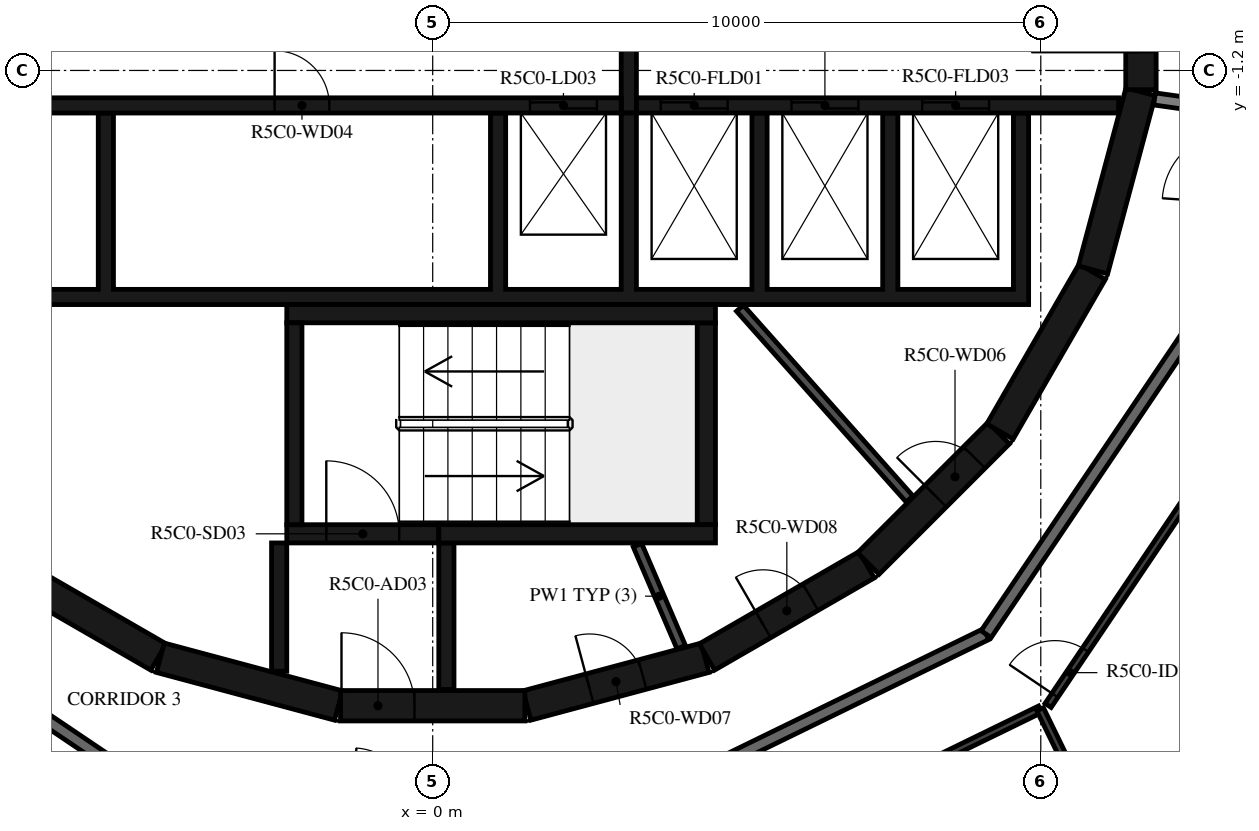
"""IFC4 building model, lengths in metres.
Left out: names, types, materials, properties, quantities, classifications, styles, units other than length and angle.
Written with IfcOpenShell. Run it as: python <this file> out.ifc"""

import sys

from ifc_helpers import new_model, si_unit, direction, frame, frame_2d, origin, place, context, subcontext, project, spatial, polyline, rectangle, outline, extrude, element, fill, save


model = new_model("IFC4")
c1 = context("Model", 3, precision=1e-05, world=origin(), true_north=direction((0.0, 1.0)))
c2 = subcontext(c1, "Body", "Model", "MODEL_VIEW")
j1 = project(units=[si_unit("LENGTHUNIT", "METRE"), si_unit("PLANEANGLEUNIT", "RADIAN")], contexts=[c1])
p1 = place(None, origin())
s1 = spatial("IfcSite", under=j1, at=p1, CompositionType="ELEMENT")
p2 = place(p1, origin())
s2 = spatial("IfcBuilding", under=s1, at=p2, CompositionType="ELEMENT")
p3 = place(p2, frame((0.0, 0.0, 216.4)))
s3 = spatial("IfcBuildingStorey", under=s2, at=p3, CompositionType="ELEMENT", Elevation=216.4)
p4 = place(p3, frame((1.55, -11.643, 0.0), z_axis=(0.0, 0.0, 1.0), x_axis=(0.965948410781, 0.258734743916, 0.0)))
e1 = element("IfcWall", 1, at=p4, inside=s3, PredefinedType="SHEAR", context=c2, shape_type="SweptSolid", body=[
    extrude(rectangle(XDim=3.033, YDim=0.5, at=frame_2d((1.516, 0.0))), origin(), (0.0, 0.0, 1.0), 3.05),
])
p5 = place(p4, frame((1.066, 0.0, 0.0)))
e2 = element("IfcOpeningElement", 2, at=p5, cuts=e1, PredefinedType="OPENING", context=c2, shape_type="SweptSolid", body=[
    extrude(rectangle(XDim=0.9, YDim=2.1, at=frame_2d((0.45, 1.05))), frame((0.0, 0.26, 0.0), z_axis=(0.0, -1.0, 0.0), x_axis=(1.0, 0.0, 0.0)), (0.0, 0.0, 1.0), 0.52),
])
p6 = place(p3, frame((4.51, -10.845, 0.0), z_axis=(0.0, 0.0, 1.0), x_axis=(0.865975092491, 0.500087131594, 0.0)))
e3 = element("IfcWall", 3, at=p6, inside=s3, PredefinedType="SHEAR", context=c2, shape_type="SweptSolid", body=[
    extrude(rectangle(XDim=3.033, YDim=0.5, at=frame_2d((1.516, 0.0))), origin(), (0.0, 0.0, 1.0), 3.05),
])
p7 = place(p6, frame((1.066, 0.0, 0.0)))
e4 = element("IfcOpeningElement", 4, at=p7, cuts=e3, PredefinedType="OPENING", context=c2, shape_type="SweptSolid", body=[
    extrude(rectangle(XDim=0.9, YDim=2.1, at=frame_2d((0.45, 1.05))), frame((0.0, 0.26, 0.0), z_axis=(0.0, -1.0, 0.0), x_axis=(1.0, 0.0, 0.0)), (0.0, 0.0, 1.0), 0.52),
])
p8 = place(p3, frame((7.164, -9.308, 0.0), z_axis=(0.0, 0.0, 1.0), x_axis=(0.707106781187, 0.707106781187, 0.0)))
e5 = element("IfcWall", 5, at=p8, inside=s3, PredefinedType="SHEAR", context=c2, shape_type="SweptSolid", body=[
    extrude(rectangle(XDim=3.032, YDim=0.5, at=frame_2d((1.516, 0.0))), origin(), (0.0, 0.0, 1.0), 3.05),
])
p9 = place(p8, frame((1.566, 0.0, 0.0)))
e6 = element("IfcOpeningElement", 6, at=p9, cuts=e5, PredefinedType="OPENING", context=c2, shape_type="SweptSolid", body=[
    extrude(rectangle(XDim=0.9, YDim=2.1, at=frame_2d((0.45, 1.05))), frame((0.0, 0.26, 0.0), z_axis=(0.0, -1.0, 0.0), x_axis=(1.0, 0.0, 0.0)), (0.0, 0.0, 1.0), 0.52),
])
for number, where, z_axis, x_axis in (
    (7, (9.329, -7.137, 0.0), (0.0, 0.0, 1.0), (0.5, 0.866, 0.0)),
    (8, (10.858, -4.479, 0.0), (0.0, 0.0, 1.0), (0.259, 0.966, 0.0)),
):
    element("IfcWall", number, at=place(p3, frame(where, z_axis=z_axis, x_axis=x_axis)), inside=s3, PredefinedType="SHEAR", context=c2, shape_type="SweptSolid", body=[
        extrude(rectangle(XDim=3.033, YDim=0.5, at=frame_2d((1.516, 0.0))), origin(), (0.0, 0.0, 1.0), 3.05),
    ])
p10 = place(p3, frame((11.647, -1.516, 0.0), z_axis=(0.0, 0.0, 1.0), x_axis=(0.0, 1.0, 0.0)))
e9 = element("IfcWall", 9, at=p10, inside=s3, PredefinedType="SHEAR", context=c2, shape_type="SweptSolid", body=[
    extrude(rectangle(XDim=3.033, YDim=0.5, at=frame_2d((1.516, 0.0))), origin(), (0.0, 0.0, 1.0), 3.05),
])
p11 = place(p10, frame((0.616, 0.0, 0.0)))
e10 = element("IfcOpeningElement", 10, at=p11, cuts=e9, PredefinedType="OPENING", context=c2, shape_type="SweptSolid", body=[
    extrude(rectangle(XDim=1.8, YDim=2.1, at=frame_2d((0.9, 1.05))), frame((0.0, 0.26, 0.0), z_axis=(0.0, -1.0, 0.0), x_axis=(1.0, 0.0, 0.0)), (0.0, 0.0, 1.0), 0.52),
])
for number, where, z_axis, x_axis in (
    (11, (-7.137, -9.329, 0.0), (0.0, 0.0, 1.0), (0.866, -0.5, 0.0)),
    (12, (-4.479, -10.858, 0.0), (0.0, 0.0, 1.0), (0.966, -0.259, 0.0)),
):
    element("IfcWall", number, at=place(p3, frame(where, z_axis=z_axis, x_axis=x_axis)), inside=s3, PredefinedType="SHEAR", context=c2, shape_type="SweptSolid", body=[
        extrude(rectangle(XDim=3.033, YDim=0.5, at=frame_2d((1.516, 0.0))), origin(), (0.0, 0.0, 1.0), 3.05),
    ])
p12 = place(p3, frame((-1.516, -11.647, 0.0), z_axis=(0.0, 0.0, 1.0), x_axis=(1.0, 0.0, 0.0)))
e13 = element("IfcWall", 13, at=p12, inside=s3, PredefinedType="SHEAR", context=c2, shape_type="SweptSolid", body=[
    extrude(rectangle(XDim=3.033, YDim=0.5, at=frame_2d((1.516, 0.0))), origin(), (0.0, 0.0, 1.0), 3.05),
])
p13 = place(p12, frame((0.016, 0.0, 0.0)))
e14 = element("IfcOpeningElement", 14, at=p13, cuts=e13, PredefinedType="OPENING", context=c2, shape_type="SweptSolid", body=[
    extrude(rectangle(XDim=1.2, YDim=2.1, at=frame_2d((0.6, 1.05))), frame((0.0, 0.26, 0.0), z_axis=(0.0, -1.0, 0.0), x_axis=(1.0, 0.0, 0.0)), (0.0, 0.0, 1.0), 0.52),
])
p14 = place(p3, frame((-2.275, -8.67, 0.0), z_axis=(0.0, 0.0, 1.0), x_axis=(0.0, 1.0, 0.0)))
e15 = element("IfcWall", 15, at=p14, inside=s3, PredefinedType="SHEAR", context=c2, shape_type="SweptSolid", body=[
    extrude(rectangle(XDim=3.32, YDim=0.25, at=frame_2d((1.66, 0.0))), origin(), (0.0, 0.0, 1.0), 3.05),
])
p15 = place(p3, frame((-2.4, -5.2, 0.0), z_axis=(0.0, 0.0, 1.0), x_axis=(1.0, 0.0, 0.0)))
e16 = element("IfcWall", 16, at=p15, inside=s3, PredefinedType="SHEAR", context=c2, shape_type="SweptSolid", body=[
    extrude(rectangle(XDim=7.05, YDim=0.3, at=frame_2d((3.525, 0.0))), origin(), (0.0, 0.0, 1.0), 3.05),
])
p16 = place(p3, frame((4.5, -8.67, 0.0), z_axis=(0.0, 0.0, 1.0), x_axis=(0.0, 1.0, 0.0)))
e17 = element("IfcWall", 17, at=p16, inside=s3, PredefinedType="SHEAR", context=c2, shape_type="SweptSolid", body=[
    extrude(rectangle(XDim=3.32, YDim=0.3, at=frame_2d((1.66, 0.0))), origin(), (0.0, 0.0, 1.0), 3.05),
])
p17 = place(p3, frame((0.1, -8.82, 0.0), z_axis=(0.0, 0.0, 1.0), x_axis=(1.0, 0.0, 0.0)))
e18 = element("IfcWall", 18, at=p17, inside=s3, PredefinedType="SHEAR", context=c2, shape_type="SweptSolid", body=[
    extrude(rectangle(XDim=4.55, YDim=0.3, at=frame_2d((2.275, 0.0))), origin(), (0.0, 0.0, 1.0), 3.05),
])
p18 = place(p3, frame((-2.4, -8.82, 0.0), z_axis=(0.0, 0.0, 1.0), x_axis=(1.0, 0.0, 0.0)))
e19 = element("IfcWall", 19, at=p18, inside=s3, PredefinedType="SHEAR", context=c2, shape_type="SweptSolid", body=[
    extrude(rectangle(XDim=2.5, YDim=0.3, at=frame_2d((1.25, 0.0))), origin(), (0.0, 0.0, 1.0), 3.05),
])
p19 = place(p18, frame((0.65, 0.0, 0.0)))
e20 = element("IfcOpeningElement", 20, at=p19, cuts=e19, PredefinedType="OPENING", context=c2, shape_type="SweptSolid", body=[
    extrude(rectangle(XDim=1.2, YDim=2.1, at=frame_2d((0.6, 1.05))), frame((0.0, 0.16, 0.0), z_axis=(0.0, -1.0, 0.0), x_axis=(1.0, 0.0, 0.0)), (0.0, 0.0, 1.0), 0.32),
])
p20 = place(p3, frame((-2.525, -8.97, 0.0), z_axis=(0.0, 0.0, 1.0), x_axis=(0.0, -1.0, 0.0)))
e21 = element("IfcWall", 21, at=p20, inside=s3, PredefinedType="SHEAR", context=c2, shape_type="SweptSolid", body=[
    extrude(rectangle(XDim=2.11, YDim=0.25, at=frame_2d((1.055, 0.0))), origin(), (0.0, 0.0, 1.0), 3.05),
])
p21 = place(p3, frame((0.225, -8.97, 0.0), z_axis=(0.0, 0.0, 1.0), x_axis=(0.0, -1.0, 0.0)))
e22 = element("IfcWall", 22, at=p21, inside=s3, PredefinedType="SHEAR", context=c2, shape_type="SweptSolid", body=[
    extrude(rectangle(XDim=2.41, YDim=0.25, at=frame_2d((1.205, 0.0))), origin(), (0.0, 0.0, 1.0), 3.05),
])
p22 = place(p3, origin())
e23 = element("IfcWall", 23, at=p22, inside=s3, PredefinedType="SHEAR", context=c2, shape_type="SweptSolid", body=[
    extrude(outline(polyline([(9.8, -5.05), (9.8, -4.8), (9.8, -1.9), (9.55, -1.9), (9.55, -4.8), (7.65, -4.8), (7.65, -1.9), (7.4, -1.9), (7.4, -4.8), (5.5, -4.8), (5.5, -1.9), (5.25, -1.9), (5.25, -4.8), (3.35, -4.8), (3.35, -1.9), (3.1, -1.9), (3.1, -4.8), (1.2, -4.8), (1.2, -1.9), (0.95, -1.9), (0.95, -4.8), (-5.25, -4.8), (-5.25, -1.9), (-5.5, -1.9), (-5.5, -4.8), (-7.4, -4.8), (-7.4, -1.9), (-7.65, -1.9), (-7.65, -4.8), (-9.55, -4.8), (-9.55, -1.9), (-9.8, -1.9), (-9.8, -4.8), (-9.8, -5.05), (9.8, -5.05)])), origin(), (0.0, 0.0, 1.0), 3.05),
])
p23 = place(p3, frame((-11.28, -1.775, 0.0), z_axis=(0.0, 0.0, 1.0), x_axis=(1.0, 0.0, 0.0)))
e24 = element("IfcWall", 24, at=p23, inside=s3, PredefinedType="SHEAR", context=c2, shape_type="SweptSolid", body=[
    extrude(rectangle(XDim=14.38, YDim=0.25, at=frame_2d((7.19, 0.0))), origin(), (0.0, 0.0, 1.0), 3.05),
])
p24 = place(p23, frame((12.88, 0.0, 0.0)))
e25 = element("IfcOpeningElement", 25, at=p24, cuts=e24, PredefinedType="OPENING", context=c2, shape_type="SweptSolid", body=[
    extrude(rectangle(XDim=1.1, YDim=2.1, at=frame_2d((0.55, 1.05))), frame((0.0, 0.135, 0.0), z_axis=(0.0, -1.0, 0.0), x_axis=(1.0, 0.0, 0.0)), (0.0, 0.0, 1.0), 0.27),
])
p25 = place(p23, frame((8.68, 0.0, 0.0)))
e26 = element("IfcOpeningElement", 26, at=p25, cuts=e24, PredefinedType="OPENING", context=c2, shape_type="SweptSolid", body=[
    extrude(rectangle(XDim=0.9, YDim=2.1, at=frame_2d((0.45, 1.05))), frame((0.0, 0.135, 0.0), z_axis=(0.0, -1.0, 0.0), x_axis=(1.0, 0.0, 0.0)), (0.0, 0.0, 1.0), 0.27),
])
p26 = place(p3, frame((3.35, -1.775, 0.0), z_axis=(0.0, 0.0, 1.0), x_axis=(1.0, 0.0, 0.0)))
e27 = element("IfcWall", 27, at=p26, inside=s3, PredefinedType="SHEAR", context=c2, shape_type="SweptSolid", body=[
    extrude(rectangle(XDim=7.93, YDim=0.25, at=frame_2d((3.965, 0.0))), origin(), (0.0, 0.0, 1.0), 3.05),
])
p27 = place(p26, frame((0.4, 0.0, 0.0)))
e28 = element("IfcOpeningElement", 28, at=p27, cuts=e27, PredefinedType="OPENING", context=c2, shape_type="SweptSolid", body=[
    extrude(rectangle(XDim=1.1, YDim=2.4, at=frame_2d((0.55, 1.2))), frame((0.0, 0.135, 0.0), z_axis=(0.0, -1.0, 0.0), x_axis=(1.0, 0.0, 0.0)), (0.0, 0.0, 1.0), 0.27),
])
p28 = place(p26, frame((2.55, 0.0, 0.0)))
e29 = element("IfcOpeningElement", 29, at=p28, cuts=e27, PredefinedType="OPENING", context=c2, shape_type="SweptSolid", body=[
    extrude(rectangle(XDim=1.1, YDim=2.4, at=frame_2d((0.55, 1.2))), frame((0.0, 0.135, 0.0), z_axis=(0.0, -1.0, 0.0), x_axis=(1.0, 0.0, 0.0)), (0.0, 0.0, 1.0), 0.27),
])
p29 = place(p26, frame((4.7, 0.0, 0.0)))
e30 = element("IfcOpeningElement", 30, at=p29, cuts=e27, PredefinedType="OPENING", context=c2, shape_type="SweptSolid", body=[
    extrude(rectangle(XDim=1.1, YDim=2.4, at=frame_2d((0.55, 1.2))), frame((0.0, 0.135, 0.0), z_axis=(0.0, -1.0, 0.0), x_axis=(1.0, 0.0, 0.0)), (0.0, 0.0, 1.0), 0.27),
])
p30 = place(p3, frame((3.225, -1.9, 0.0), z_axis=(0.0, 0.0, 1.0), x_axis=(0.0, 1.0, 0.0)))
e31 = element("IfcWall", 31, at=p30, inside=s3, PredefinedType="SHEAR", context=c2, shape_type="SweptSolid", body=[
    extrude(rectangle(XDim=3.8, YDim=0.25, at=frame_2d((1.9, 0.0))), origin(), (0.0, 0.0, 1.0), 3.05),
])
p31 = place(p3, frame((7.842, -8.248, 0.0), z_axis=(0.0, 0.0, 1.0), x_axis=(-0.66446128181, 0.747322691329, 0.0)))
e32 = element("IfcWall", 32, at=p31, inside=s3, PredefinedType="PARTITIONING", context=c2, shape_type="SweptSolid", body=[
    extrude(rectangle(XDim=4.198, YDim=0.15, at=frame_2d((2.099, 0.0))), origin(), (0.0, 0.0, 1.0), 3.05),
])
p32 = place(p3, frame((3.367, -9.007, 0.0), z_axis=(0.0, 0.0, 1.0), x_axis=(0.394387482265, -0.918944238696, 0.0)))
e33 = element("IfcWall", 33, at=p32, inside=s3, PredefinedType="PARTITIONING", context=c2, shape_type="SweptSolid", body=[
    extrude(rectangle(XDim=1.825, YDim=0.15, at=frame_2d((0.913, 0.0))), origin(), (0.0, 0.0, 1.0), 3.05),
])
p33 = place(p3, frame((13.302, -1.869, 0.0), z_axis=(0.0, 0.0, 1.0), x_axis=(-0.990274397042, 0.13912806533, 0.0)))
e34 = element("IfcWall", 34, at=p33, inside=s3, PredefinedType="STANDARD", context=c2, shape_type="SweptSolid", body=[
    extrude(rectangle(XDim=1.446, YDim=0.2, at=frame_2d((0.723, 0.0))), origin(), (0.0, 0.0, 1.0), 3.05),
])
p34 = place(p3, frame((-10.47, -9.101, 0.0), z_axis=(0.0, 0.0, 1.0), x_axis=(0.829035841718, -0.559195469534, 0.0)))
e35 = element("IfcWall", 35, at=p34, inside=s3, PredefinedType="STANDARD", context=c2, shape_type="SweptSolid", body=[
    extrude(rectangle(XDim=7.181, YDim=0.2, at=frame_2d((3.591, 0.0))), origin(), (0.0, 0.0, 1.0), 3.05),
])
p35 = place(p34, frame((2.39, 0.0, 0.0)))
e36 = element("IfcOpeningElement", 36, at=p35, cuts=e35, PredefinedType="OPENING", context=c2, shape_type="SweptSolid", body=[
    extrude(rectangle(XDim=1.0, YDim=2.1, at=frame_2d((0.5, 1.05))), frame((0.0, 0.11, 0.0), z_axis=(0.0, -1.0, 0.0), x_axis=(1.0, 0.0, 0.0)), (0.0, 0.0, 1.0), 0.22),
])
p36 = place(p3, frame((2.647, -13.618, 0.0), z_axis=(0.0, 0.0, 1.0), x_axis=(0.898796543751, 0.438366026218, 0.0)))
e37 = element("IfcWall", 37, at=p36, inside=s3, PredefinedType="STANDARD", context=c2, shape_type="SweptSolid", body=[
    extrude(rectangle(XDim=7.181, YDim=0.2, at=frame_2d((3.591, 0.0))), origin(), (0.0, 0.0, 1.0), 3.05),
])
p37 = place(p36, frame((0.2, 0.0, 0.0)))
e38 = element("IfcOpeningElement", 38, at=p37, cuts=e37, PredefinedType="OPENING", context=c2, shape_type="SweptSolid", body=[
    extrude(rectangle(XDim=1.0, YDim=2.1, at=frame_2d((0.5, 1.05))), frame((0.0, 0.11, 0.0), z_axis=(0.0, -1.0, 0.0), x_axis=(1.0, 0.0, 0.0)), (0.0, 0.0, 1.0), 0.22),
])
p38 = place(p3, frame((9.101, -10.47, 0.0), z_axis=(0.0, 0.0, 1.0), x_axis=(0.559195469534, 0.829035841718, 0.0)))
e39 = element("IfcWall", 39, at=p38, inside=s3, PredefinedType="STANDARD", context=c2, shape_type="SweptSolid", body=[
    extrude(rectangle(XDim=7.181, YDim=0.2, at=frame_2d((3.591, 0.0))), origin(), (0.0, 0.0, 1.0), 3.05),
])
p39 = place(p3, frame((-11.642, -10.12, 0.0), z_axis=(0.0, 0.0, 1.0), x_axis=(0.829029427133, -0.559204979365, 0.0)))
e40 = element("IfcWall", 40, at=p39, inside=s3, PredefinedType="PARTITIONING", context=c2, shape_type="SweptSolid", body=[
    extrude(rectangle(XDim=6.904, YDim=0.12, at=frame_2d((3.452, 0.0))), origin(), (0.0, 0.0, 1.0), 3.05),
])
p40 = place(p39, frame((0.2, 0.0, 0.0)))
e41 = element("IfcOpeningElement", 41, at=p40, cuts=e40, PredefinedType="OPENING", context=c2, shape_type="SweptSolid", body=[
    extrude(rectangle(XDim=0.9, YDim=2.1, at=frame_2d((0.45, 1.05))), frame((0.0, 0.07, 0.0), z_axis=(0.0, -1.0, 0.0), x_axis=(1.0, 0.0, 0.0)), (0.0, 0.0, 1.0), 0.14),
])
p41 = place(p39, frame((4.192, 0.0, 0.0)))
e42 = element("IfcOpeningElement", 42, at=p41, cuts=e40, PredefinedType="OPENING", context=c2, shape_type="SweptSolid", body=[
    extrude(rectangle(XDim=0.9, YDim=2.1, at=frame_2d((0.45, 1.05))), frame((0.0, 0.07, 0.0), z_axis=(0.0, -1.0, 0.0), x_axis=(1.0, 0.0, 0.0)), (0.0, 0.0, 1.0), 0.14),
])
p42 = place(p3, frame((3.074, -15.078, 0.0), z_axis=(0.0, 0.0, 1.0), x_axis=(0.898800770739, 0.438357359377, 0.0)))
e43 = element("IfcWall", 43, at=p42, inside=s3, PredefinedType="PARTITIONING", context=c2, shape_type="SweptSolid", body=[
    extrude(rectangle(XDim=7.694, YDim=0.12, at=frame_2d((3.847, 0.0))), origin(), (0.0, 0.0, 1.0), 3.05),
])
p43 = place(p42, frame((0.2, 0.0, 0.0)))
e44 = element("IfcOpeningElement", 44, at=p43, cuts=e43, PredefinedType="OPENING", context=c2, shape_type="SweptSolid", body=[
    extrude(rectangle(XDim=0.9, YDim=2.1, at=frame_2d((0.45, 1.05))), frame((0.0, 0.07, 0.0), z_axis=(0.0, -1.0, 0.0), x_axis=(1.0, 0.0, 0.0)), (0.0, 0.0, 1.0), 0.14),
])
p44 = place(p3, frame((10.12, -11.642, 0.0), z_axis=(0.0, 0.0, 1.0), x_axis=(0.559201404667, 0.829031838362, 0.0)))
e45 = element("IfcWall", 45, at=p44, inside=s3, PredefinedType="PARTITIONING", context=c2, shape_type="SweptSolid", body=[
    extrude(rectangle(XDim=7.709, YDim=0.12, at=frame_2d((3.854, 0.0))), origin(), (0.0, 0.0, 1.0), 3.05),
])
p45 = place(p44, frame((0.2, 0.0, 0.0)))
e46 = element("IfcOpeningElement", 46, at=p45, cuts=e45, PredefinedType="OPENING", context=c2, shape_type="SweptSolid", body=[
    extrude(rectangle(XDim=0.9, YDim=2.1, at=frame_2d((0.45, 1.05))), frame((0.0, 0.07, 0.0), z_axis=(0.0, -1.0, 0.0), x_axis=(1.0, 0.0, 0.0)), (0.0, 0.0, 1.0), 0.14),
])
p46 = place(p3, frame((11.427, -14.654, 0.0), z_axis=(0.0, 0.0, 1.0), x_axis=(-0.438410435857, 0.898774882677, 0.0)))
e47 = element("IfcWall", 47, at=p46, inside=s3, PredefinedType="PARTITIONING", context=c2, shape_type="SweptSolid", body=[
    extrude(rectangle(XDim=3.281, YDim=0.12, at=frame_2d((1.64, 0.0))), origin(), (0.0, 0.0, 1.0), 3.05),
])
p47 = place(p19, origin())
e48 = element("IfcDoor", 48, at=p47, inside=s3, OperationType="SINGLE_SWING_LEFT", PredefinedType="DOOR", context=c2, shape_type="SweptSolid", body=[
    extrude(rectangle(XDim=1.2, YDim=2.1, at=frame_2d((0.6, 1.05))), frame((0.0, 0.025, 0.0), z_axis=(0.0, -1.0, 0.0), x_axis=(1.0, 0.0, 0.0)), (0.0, 0.0, 1.0), 0.05),
])
fill(e20, e48)
p48 = place(p13, origin())
e49 = element("IfcDoor", 49, at=p48, inside=s3, OperationType="SINGLE_SWING_RIGHT", PredefinedType="DOOR", context=c2, shape_type="SweptSolid", body=[
    extrude(rectangle(XDim=1.2, YDim=2.1, at=frame_2d((0.6, 1.05))), frame((0.0, 0.025, 0.0), z_axis=(0.0, -1.0, 0.0), x_axis=(1.0, 0.0, 0.0)), (0.0, 0.0, 1.0), 0.05),
])
fill(e14, e49)
p49 = place(p11, origin())
e50 = element("IfcDoor", 50, at=p49, inside=s3, OperationType="DOUBLE_DOOR_SINGLE_SWING", PredefinedType="DOOR", context=c2, shape_type="SweptSolid", body=[
    extrude(rectangle(XDim=1.8, YDim=2.1, at=frame_2d((0.9, 1.05))), frame((0.0, 0.025, 0.0), z_axis=(0.0, -1.0, 0.0), x_axis=(1.0, 0.0, 0.0)), (0.0, 0.0, 1.0), 0.05),
])
fill(e10, e50)
p50 = place(p24, origin())
e51 = element("IfcDoor", 51, at=p50, inside=s3, OperationType="DOUBLE_DOOR_SLIDING", PredefinedType="DOOR", context=c2, shape_type="SweptSolid", body=[
    extrude(rectangle(XDim=1.1, YDim=2.1, at=frame_2d((0.55, 1.05))), frame((0.0, 0.025, 0.0), z_axis=(0.0, -1.0, 0.0), x_axis=(1.0, 0.0, 0.0)), (0.0, 0.0, 1.0), 0.05),
])
fill(e25, e51)
p51 = place(p27, origin())
e52 = element("IfcDoor", 52, at=p51, inside=s3, OperationType="DOUBLE_DOOR_SLIDING", PredefinedType="DOOR", context=c2, shape_type="SweptSolid", body=[
    extrude(rectangle(XDim=1.1, YDim=2.4, at=frame_2d((0.55, 1.2))), frame((0.0, 0.025, 0.0), z_axis=(0.0, -1.0, 0.0), x_axis=(1.0, 0.0, 0.0)), (0.0, 0.0, 1.0), 0.05),
])
fill(e28, e52)
p52 = place(p28, origin())
e53 = element("IfcDoor", 53, at=p52, inside=s3, OperationType="DOUBLE_DOOR_SLIDING", PredefinedType="DOOR", context=c2, shape_type="SweptSolid", body=[
    extrude(rectangle(XDim=1.1, YDim=2.4, at=frame_2d((0.55, 1.2))), frame((0.0, 0.025, 0.0), z_axis=(0.0, -1.0, 0.0), x_axis=(1.0, 0.0, 0.0)), (0.0, 0.0, 1.0), 0.05),
])
fill(e29, e53)
p53 = place(p29, origin())
e54 = element("IfcDoor", 54, at=p53, inside=s3, OperationType="DOUBLE_DOOR_SLIDING", PredefinedType="DOOR", context=c2, shape_type="SweptSolid", body=[
    extrude(rectangle(XDim=1.1, YDim=2.4, at=frame_2d((0.55, 1.2))), frame((0.0, 0.025, 0.0), z_axis=(0.0, -1.0, 0.0), x_axis=(1.0, 0.0, 0.0)), (0.0, 0.0, 1.0), 0.05),
])
fill(e30, e54)
p54 = place(p25, origin())
e55 = element("IfcDoor", 55, at=p54, inside=s3, OperationType="SINGLE_SWING_RIGHT", PredefinedType="DOOR", context=c2, shape_type="SweptSolid", body=[
    extrude(rectangle(XDim=0.9, YDim=2.1, at=frame_2d((0.45, 1.05))), frame((0.0, 0.025, 0.0), z_axis=(0.0, -1.0, 0.0), x_axis=(1.0, 0.0, 0.0)), (0.0, 0.0, 1.0), 0.05),
])
fill(e26, e55)
p55 = place(p9, origin())
e56 = element("IfcDoor", 56, at=p55, inside=s3, OperationType="SINGLE_SWING_RIGHT", PredefinedType="DOOR", context=c2, shape_type="SweptSolid", body=[
    extrude(rectangle(XDim=0.9, YDim=2.1, at=frame_2d((0.45, 1.05))), frame((0.0, 0.025, 0.0), z_axis=(0.0, -1.0, 0.0), x_axis=(1.0, 0.0, 0.0)), (0.0, 0.0, 1.0), 0.05),
])
fill(e6, e56)
p56 = place(p5, origin())
e57 = element("IfcDoor", 57, at=p56, inside=s3, OperationType="SINGLE_SWING_LEFT", PredefinedType="DOOR", context=c2, shape_type="SweptSolid", body=[
    extrude(rectangle(XDim=0.9, YDim=2.1, at=frame_2d((0.45, 1.05))), frame((0.0, 0.025, 0.0), z_axis=(0.0, -1.0, 0.0), x_axis=(1.0, 0.0, 0.0)), (0.0, 0.0, 1.0), 0.05),
])
fill(e2, e57)
p57 = place(p7, origin())
e58 = element("IfcDoor", 58, at=p57, inside=s3, OperationType="SINGLE_SWING_RIGHT", PredefinedType="DOOR", context=c2, shape_type="SweptSolid", body=[
    extrude(rectangle(XDim=0.9, YDim=2.1, at=frame_2d((0.45, 1.05))), frame((0.0, 0.025, 0.0), z_axis=(0.0, -1.0, 0.0), x_axis=(1.0, 0.0, 0.0)), (0.0, 0.0, 1.0), 0.05),
])
fill(e4, e58)
p58 = place(p45, origin())
e59 = element("IfcDoor", 59, at=p58, inside=s3, OperationType="SINGLE_SWING_RIGHT", PredefinedType="DOOR", context=c2, shape_type="SweptSolid", body=[
    extrude(rectangle(XDim=0.9, YDim=2.1, at=frame_2d((0.45, 1.05))), frame((0.0, 0.025, 0.0), z_axis=(0.0, -1.0, 0.0), x_axis=(1.0, 0.0, 0.0)), (0.0, 0.0, 1.0), 0.05),
])
fill(e46, e59)
save(model, sys.argv[1])
